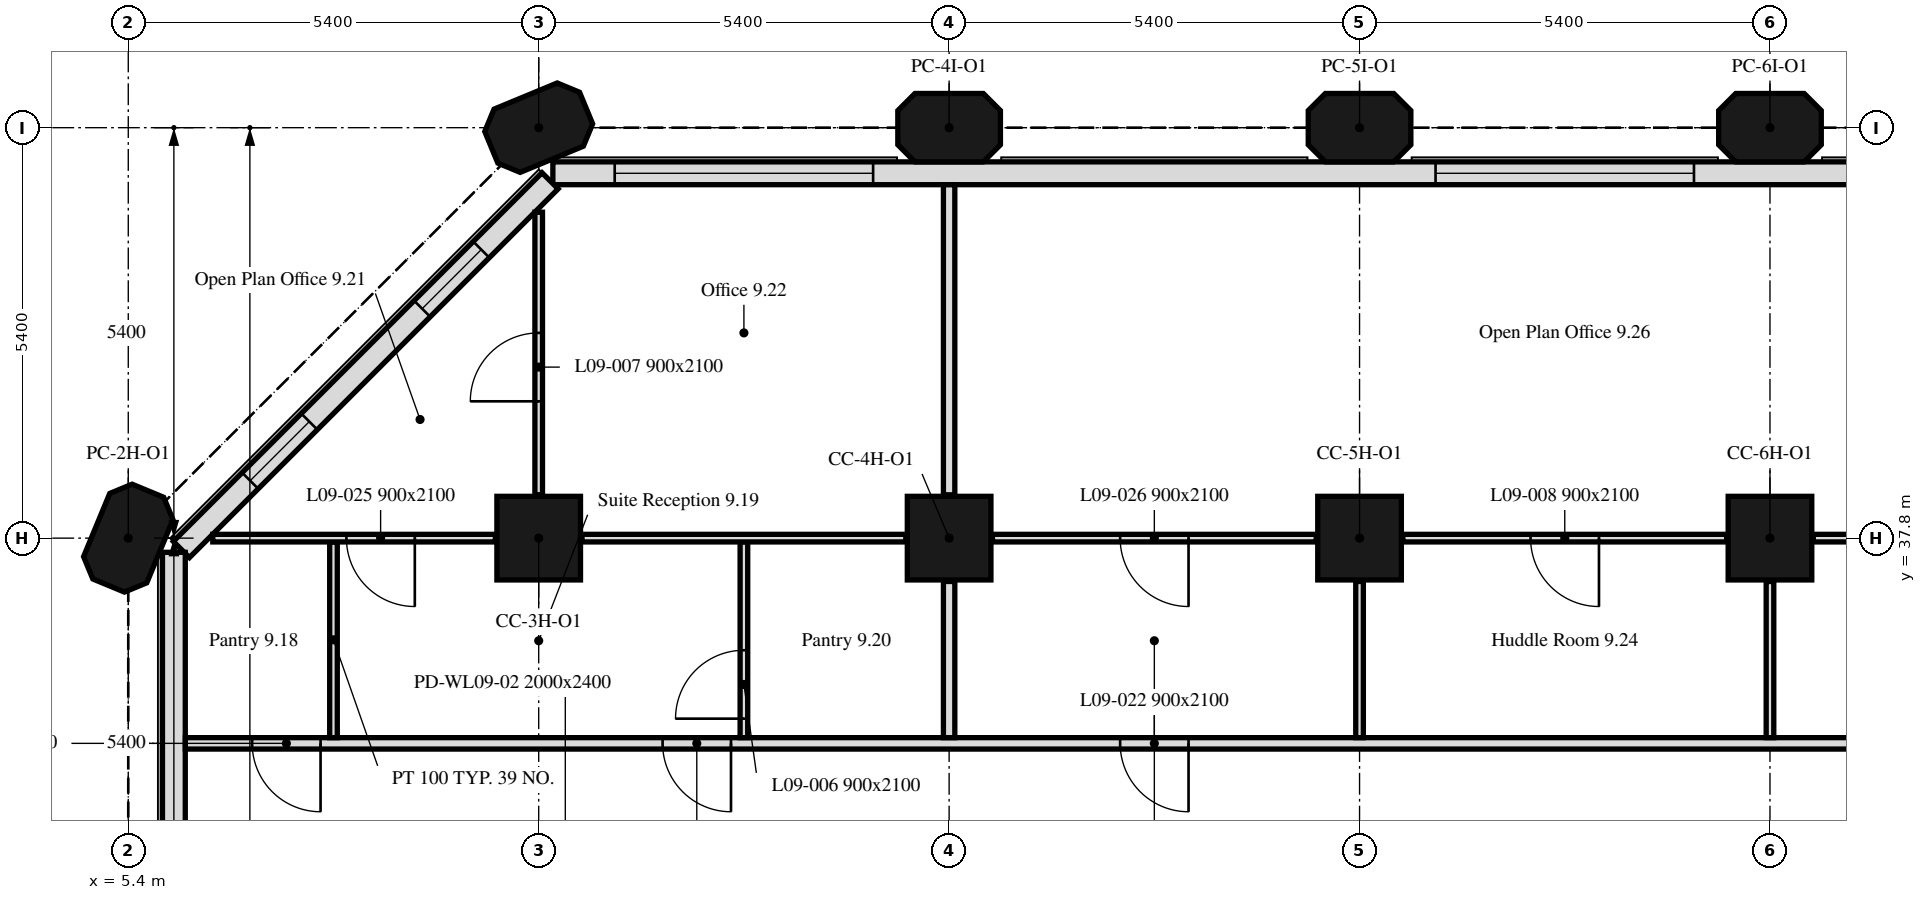
"""IFC4 building model, lengths in metres.
Left out: names, types, materials, properties, quantities, classifications, styles, units other than length and angle.
Written with IfcOpenShell. Run it as: python <this file> out.ifc"""

import sys

from ifc_helpers import new_model, si_unit, direction, frame, frame_2d, origin, origin_2d, place, context, subcontext, project, spatial, polyline, rectangle, outline, extrude, element, fill, save


model = new_model("IFC4")
c1 = context("Model", 3, precision=1e-05, world=origin(), true_north=direction((0.0, 1.0)))
c2 = subcontext(c1, "Body", "Model", "MODEL_VIEW")
j1 = project(units=[si_unit("LENGTHUNIT", "METRE"), si_unit("PLANEANGLEUNIT", "RADIAN")], contexts=[c1])
p1 = place(None, origin())
s1 = spatial("IfcSite", under=j1, at=p1, CompositionType="ELEMENT")
p2 = place(p1, origin())
s2 = spatial("IfcBuilding", under=s1, at=p2, CompositionType="ELEMENT")
p3 = place(p2, frame((0.0, 0.0, 45.0)))
s3 = spatial("IfcBuildingStorey", under=s2, at=p3, CompositionType="ELEMENT", Elevation=45.0)
p4 = place(p3, frame((5.4, 37.8, 0.0), z_axis=(0.0, 0.0, 1.0), x_axis=(0.382683432365, 0.923879532511, 0.0)))
e1 = element("IfcColumn", 1, at=p4, inside=s3, PredefinedType="COLUMN", context=c2, shape_type="SweptSolid", body=[
    extrude(outline(polyline([(-0.45, -0.45), (0.45, -0.45), (0.675, -0.225), (0.675, 0.225), (0.45, 0.45), (-0.45, 0.45), (-0.675, 0.225), (-0.675, -0.225), (-0.45, -0.45)])), origin(), (0.0, 0.0, 1.0), 3.5),
])
for number, where, z_axis, x_axis in (
    (2, (10.8, 37.8, 0.0), (0.0, 0.0, 1.0), (1.0, 0.0, 0.0)),
    (3, (16.2, 37.8, 0.0), (0.0, 0.0, 1.0), (1.0, 0.0, 0.0)),
    (4, (21.6, 37.8, 0.0), (0.0, 0.0, 1.0), (1.0, 0.0, 0.0)),
    (5, (27.0, 37.8, 0.0), (0.0, 0.0, 1.0), (1.0, 0.0, 0.0)),
):
    element("IfcColumn", number, at=place(p3, frame(where, z_axis=z_axis, x_axis=x_axis)), inside=s3, PredefinedType="COLUMN", context=c2, shape_type="SweptSolid", body=[
        extrude(rectangle(XDim=1.1, YDim=1.1, at=origin_2d()), origin(), (0.0, 0.0, 1.0), 3.5),
    ])
for number, where, z_axis, x_axis in (
    (6, (10.8, 43.2, 0.0), (0.0, 0.0, 1.0), (0.924, 0.383, 0.0)),
    (7, (16.2, 43.2, 0.0), (0.0, 0.0, 1.0), (1.0, 0.0, 0.0)),
    (8, (21.6, 43.2, 0.0), (0.0, 0.0, 1.0), (1.0, 0.0, 0.0)),
    (9, (27.0, 43.2, 0.0), (0.0, 0.0, 1.0), (1.0, 0.0, 0.0)),
):
    element("IfcColumn", number, at=place(p3, frame(where, z_axis=z_axis, x_axis=x_axis)), inside=s3, PredefinedType="COLUMN", context=c2, shape_type="SweptSolid", body=[
        extrude(outline(polyline([(-0.45, -0.45), (0.45, -0.45), (0.675, -0.225), (0.675, 0.225), (0.45, 0.45), (-0.45, 0.45), (-0.675, 0.225), (-0.675, -0.225), (-0.45, -0.45)])), origin(), (0.0, 0.0, 1.0), 3.5),
    ])
p5 = place(p3, frame((43.014, 42.6, 0.0), z_axis=(0.0, 0.0, 1.0), x_axis=(-1.0, 0.0, 0.0)))
e10 = element("IfcWall", 10, at=p5, inside=s3, PredefinedType="SOLIDWALL", context=c2, shape_type="SweptSolid", body=[
    extrude(rectangle(XDim=32.027, YDim=0.3, at=frame_2d((16.014, 0.0))), origin(), (0.0, 0.0, 1.0), 3.5),
])
p6 = place(p5, frame((6.214, 0.0, 0.9)))
e11 = element("IfcOpeningElement", 11, at=p6, cuts=e10, PredefinedType="OPENING", context=c2, shape_type="SweptSolid", body=[
    extrude(rectangle(XDim=3.4, YDim=1.7, at=frame_2d((1.7, 0.85))), frame((0.0, 0.16, 0.0), z_axis=(0.0, -1.0, 0.0), x_axis=(1.0, 0.0, 0.0)), (0.0, 0.0, 1.0), 0.32),
])
p7 = place(p5, frame((17.014, 0.0, 0.9)))
e12 = element("IfcOpeningElement", 12, at=p7, cuts=e10, PredefinedType="OPENING", context=c2, shape_type="SweptSolid", body=[
    extrude(rectangle(XDim=3.4, YDim=1.7, at=frame_2d((1.7, 0.85))), frame((0.0, 0.16, 0.0), z_axis=(0.0, -1.0, 0.0), x_axis=(1.0, 0.0, 0.0)), (0.0, 0.0, 1.0), 0.32),
])
p8 = place(p5, frame((27.814, 0.0, 0.9)))
e13 = element("IfcOpeningElement", 13, at=p8, cuts=e10, PredefinedType="OPENING", context=c2, shape_type="SweptSolid", body=[
    extrude(rectangle(XDim=3.4, YDim=1.7, at=frame_2d((1.7, 0.85))), frame((0.0, 0.16, 0.0), z_axis=(0.0, -1.0, 0.0), x_axis=(1.0, 0.0, 0.0)), (0.0, 0.0, 1.0), 0.32),
])
p9 = place(p3, frame((10.949, 42.501, 0.0), z_axis=(0.0, 0.0, 1.0), x_axis=(-0.707106781187, -0.707106781187, 0.0)))
e14 = element("IfcWall", 14, at=p9, inside=s3, PredefinedType="SOLIDWALL", context=c2, shape_type="SweptSolid", body=[
    extrude(rectangle(XDim=6.86, YDim=0.3, at=frame_2d((3.43, 0.0))), origin(), (0.0, 0.0, 1.0), 3.5),
])
p10 = place(p9, frame((1.28, 0.0, 0.9)))
e15 = element("IfcOpeningElement", 15, at=p10, cuts=e14, PredefinedType="OPENING", context=c2, shape_type="SweptSolid", body=[
    extrude(rectangle(XDim=1.1, YDim=1.7, at=frame_2d((0.55, 0.85))), frame((0.0, 0.16, 0.0), z_axis=(0.0, -1.0, 0.0), x_axis=(1.0, 0.0, 0.0)), (0.0, 0.0, 1.0), 0.32),
])
p11 = place(p9, frame((4.48, 0.0, 0.9)))
e16 = element("IfcOpeningElement", 16, at=p11, cuts=e14, PredefinedType="OPENING", context=c2, shape_type="SweptSolid", body=[
    extrude(rectangle(XDim=1.1, YDim=1.7, at=frame_2d((0.55, 0.85))), frame((0.0, 0.16, 0.0), z_axis=(0.0, -1.0, 0.0), x_axis=(1.0, 0.0, 0.0)), (0.0, 0.0, 1.0), 0.32),
])
p12 = place(p3, frame((6.0, 37.614, 0.0), z_axis=(0.0, 0.0, 1.0), x_axis=(0.0, -1.0, 0.0)))
e17 = element("IfcWall", 17, at=p12, inside=s3, PredefinedType="SOLIDWALL", context=c2, shape_type="SweptSolid", body=[
    extrude(rectangle(XDim=5.214, YDim=0.3, at=frame_2d((2.607, 0.0))), origin(), (0.0, 0.0, 1.0), 3.5),
])
p13 = place(p3, frame((47.849, 35.1, 0.0), z_axis=(0.0, 0.0, 1.0), x_axis=(-1.0, 0.0, 0.0)))
e18 = element("IfcWall", 18, at=p13, inside=s3, PredefinedType="PARTITIONING", context=c2, shape_type="SweptSolid", body=[
    extrude(rectangle(XDim=41.698, YDim=0.15, at=frame_2d((20.849, 0.0))), origin(), (0.0, 0.0, 1.0), 3.5),
])
p14 = place(p13, frame((39.919, 0.0, 0.0)))
e19 = element("IfcOpeningElement", 19, at=p14, cuts=e18, PredefinedType="OPENING", context=c2, shape_type="SweptSolid", body=[
    extrude(rectangle(XDim=0.9, YDim=2.1, at=frame_2d((0.45, 1.05))), frame((0.0, 0.075, 0.0), z_axis=(0.0, -1.0, 0.0), x_axis=(1.0, 0.0, 0.0)), (0.0, 0.0, 1.0), 0.15),
])
p15 = place(p13, frame((12.919, 0.0, 0.0)))
e20 = element("IfcOpeningElement", 20, at=p15, cuts=e18, PredefinedType="OPENING", context=c2, shape_type="SweptSolid", body=[
    extrude(rectangle(XDim=0.9, YDim=2.1, at=frame_2d((0.45, 1.05))), frame((0.0, 0.075, 0.0), z_axis=(0.0, -1.0, 0.0), x_axis=(1.0, 0.0, 0.0)), (0.0, 0.0, 1.0), 0.15),
])
p16 = place(p13, frame((28.499, 0.0, 0.0)))
e21 = element("IfcOpeningElement", 21, at=p16, cuts=e18, PredefinedType="OPENING", context=c2, shape_type="SweptSolid", body=[
    extrude(rectangle(XDim=0.9, YDim=2.1, at=frame_2d((0.45, 1.05))), frame((0.0, 0.075, 0.0), z_axis=(0.0, -1.0, 0.0), x_axis=(1.0, 0.0, 0.0)), (0.0, 0.0, 1.0), 0.15),
])
p17 = place(p13, frame((34.519, 0.0, 0.0)))
e22 = element("IfcOpeningElement", 22, at=p17, cuts=e18, PredefinedType="OPENING", context=c2, shape_type="SweptSolid", body=[
    extrude(rectangle(XDim=0.9, YDim=2.1, at=frame_2d((0.45, 1.05))), frame((0.0, 0.075, 0.0), z_axis=(0.0, -1.0, 0.0), x_axis=(1.0, 0.0, 0.0)), (0.0, 0.0, 1.0), 0.15),
])
p18 = place(p13, frame((6.279, 0.0, 0.0)))
e23 = element("IfcOpeningElement", 23, at=p18, cuts=e18, PredefinedType="OPENING", context=c2, shape_type="SweptSolid", body=[
    extrude(rectangle(XDim=0.9, YDim=2.1, at=frame_2d((0.45, 1.05))), frame((0.0, 0.075, 0.0), z_axis=(0.0, -1.0, 0.0), x_axis=(1.0, 0.0, 0.0)), (0.0, 0.0, 1.0), 0.15),
])
p19 = place(p3, frame((8.1, 35.175, 0.0), z_axis=(0.0, 0.0, 1.0), x_axis=(0.0, 1.0, 0.0)))
e24 = element("IfcWall", 24, at=p19, inside=s3, PredefinedType="PARTITIONING", context=c2, shape_type="SweptSolid", body=[
    extrude(rectangle(XDim=2.575, YDim=0.1, at=frame_2d((1.288, 0.0))), origin(), (0.0, 0.0, 1.0), 3.5),
])
p20 = place(p3, frame((13.5, 35.175, 0.0), z_axis=(0.0, 0.0, 1.0), x_axis=(0.0, 1.0, 0.0)))
e25 = element("IfcWall", 25, at=p20, inside=s3, PredefinedType="PARTITIONING", context=c2, shape_type="SweptSolid", body=[
    extrude(rectangle(XDim=2.575, YDim=0.1, at=frame_2d((1.288, 0.0))), origin(), (0.0, 0.0, 1.0), 3.5),
])
p21 = place(p20, frame((0.25, 0.0, 0.0)))
e26 = element("IfcOpeningElement", 26, at=p21, cuts=e25, PredefinedType="OPENING", context=c2, shape_type="SweptSolid", body=[
    extrude(rectangle(XDim=0.9, YDim=2.1, at=frame_2d((0.45, 1.05))), frame((0.0, 0.05, 0.0), z_axis=(0.0, -1.0, 0.0), x_axis=(1.0, 0.0, 0.0)), (0.0, 0.0, 1.0), 0.1),
])
p22 = place(p3, frame((10.23, 37.8, 0.0), z_axis=(0.0, 0.0, 1.0), x_axis=(-1.0, 0.0, 0.0)))
e27 = element("IfcWall", 27, at=p22, inside=s3, PredefinedType="PARTITIONING", context=c2, shape_type="SweptSolid", body=[
    extrude(rectangle(XDim=3.718, YDim=0.1, at=frame_2d((1.859, 0.0))), origin(), (0.0, 0.0, 1.0), 3.5),
])
p23 = place(p22, frame((1.06, 0.0, 0.0)))
e28 = element("IfcOpeningElement", 28, at=p23, cuts=e27, PredefinedType="OPENING", context=c2, shape_type="SweptSolid", body=[
    extrude(rectangle(XDim=0.9, YDim=2.1, at=frame_2d((0.45, 1.05))), frame((0.0, 0.05, 0.0), z_axis=(0.0, -1.0, 0.0), x_axis=(1.0, 0.0, 0.0)), (0.0, 0.0, 1.0), 0.1),
])
p24 = place(p3, frame((16.2, 35.175, 0.0), z_axis=(0.0, 0.0, 1.0), x_axis=(0.0, 1.0, 0.0)))
e29 = element("IfcWall", 29, at=p24, inside=s3, PredefinedType="PARTITIONING", context=c2, shape_type="SweptSolid", body=[
    extrude(rectangle(XDim=2.055, YDim=0.15, at=frame_2d((1.027, 0.0))), origin(), (0.0, 0.0, 1.0), 3.5),
])
p25 = place(p3, frame((15.63, 37.8, 0.0), z_axis=(0.0, 0.0, 1.0), x_axis=(-1.0, 0.0, 0.0)))
e30 = element("IfcWall", 30, at=p25, inside=s3, PredefinedType="PARTITIONING", context=c2, shape_type="SweptSolid", body=[
    extrude(rectangle(XDim=4.26, YDim=0.1, at=frame_2d((2.13, 0.0))), origin(), (0.0, 0.0, 1.0), 3.5),
])
p26 = place(p3, frame((10.8, 38.37, 0.0), z_axis=(0.0, 0.0, 1.0), x_axis=(0.0, 1.0, 0.0)))
e31 = element("IfcWall", 31, at=p26, inside=s3, PredefinedType="PARTITIONING", context=c2, shape_type="SweptSolid", body=[
    extrude(rectangle(XDim=3.718, YDim=0.1, at=frame_2d((1.859, 0.0))), origin(), (0.0, 0.0, 1.0), 3.5),
])
p27 = place(p26, frame((1.23, 0.0, 0.0)))
e32 = element("IfcOpeningElement", 32, at=p27, cuts=e31, PredefinedType="OPENING", context=c2, shape_type="SweptSolid", body=[
    extrude(rectangle(XDim=0.9, YDim=2.1, at=frame_2d((0.45, 1.05))), frame((0.0, 0.05, 0.0), z_axis=(0.0, -1.0, 0.0), x_axis=(1.0, 0.0, 0.0)), (0.0, 0.0, 1.0), 0.1),
])
p28 = place(p3, frame((16.2, 38.37, 0.0), z_axis=(0.0, 0.0, 1.0), x_axis=(0.0, 1.0, 0.0)))
e33 = element("IfcWall", 33, at=p28, inside=s3, PredefinedType="PARTITIONING", context=c2, shape_type="SweptSolid", body=[
    extrude(rectangle(XDim=4.079, YDim=0.15, at=frame_2d((2.04, 0.0))), origin(), (0.0, 0.0, 1.0), 3.5),
])
p29 = place(p3, frame((21.6, 35.175, 0.0), z_axis=(0.0, 0.0, 1.0), x_axis=(0.0, 1.0, 0.0)))
e34 = element("IfcWall", 34, at=p29, inside=s3, PredefinedType="PARTITIONING", context=c2, shape_type="SweptSolid", body=[
    extrude(rectangle(XDim=2.055, YDim=0.1, at=frame_2d((1.027, 0.0))), origin(), (0.0, 0.0, 1.0), 3.5),
])
p30 = place(p3, frame((21.03, 37.8, 0.0), z_axis=(0.0, 0.0, 1.0), x_axis=(-1.0, 0.0, 0.0)))
e35 = element("IfcWall", 35, at=p30, inside=s3, PredefinedType="PARTITIONING", context=c2, shape_type="SweptSolid", body=[
    extrude(rectangle(XDim=4.26, YDim=0.1, at=frame_2d((2.13, 0.0))), origin(), (0.0, 0.0, 1.0), 3.5),
])
p31 = place(p30, frame((1.68, 0.0, 0.0)))
e36 = element("IfcOpeningElement", 36, at=p31, cuts=e35, PredefinedType="OPENING", context=c2, shape_type="SweptSolid", body=[
    extrude(rectangle(XDim=0.9, YDim=2.1, at=frame_2d((0.45, 1.05))), frame((0.0, 0.05, 0.0), z_axis=(0.0, -1.0, 0.0), x_axis=(1.0, 0.0, 0.0)), (0.0, 0.0, 1.0), 0.1),
])
p32 = place(p3, frame((27.0, 35.175, 0.0), z_axis=(0.0, 0.0, 1.0), x_axis=(0.0, 1.0, 0.0)))
e37 = element("IfcWall", 37, at=p32, inside=s3, PredefinedType="PARTITIONING", context=c2, shape_type="SweptSolid", body=[
    extrude(rectangle(XDim=2.055, YDim=0.1, at=frame_2d((1.027, 0.0))), origin(), (0.0, 0.0, 1.0), 3.5),
])
p33 = place(p3, frame((26.43, 37.8, 0.0), z_axis=(0.0, 0.0, 1.0), x_axis=(-1.0, 0.0, 0.0)))
e38 = element("IfcWall", 38, at=p33, inside=s3, PredefinedType="PARTITIONING", context=c2, shape_type="SweptSolid", body=[
    extrude(rectangle(XDim=4.26, YDim=0.1, at=frame_2d((2.13, 0.0))), origin(), (0.0, 0.0, 1.0), 3.5),
])
p34 = place(p33, frame((1.68, 0.0, 0.0)))
e39 = element("IfcOpeningElement", 39, at=p34, cuts=e38, PredefinedType="OPENING", context=c2, shape_type="SweptSolid", body=[
    extrude(rectangle(XDim=0.9, YDim=2.1, at=frame_2d((0.45, 1.05))), frame((0.0, 0.05, 0.0), z_axis=(0.0, -1.0, 0.0), x_axis=(1.0, 0.0, 0.0)), (0.0, 0.0, 1.0), 0.1),
])
p35 = place(p3, frame((31.83, 37.8, 0.0), z_axis=(0.0, 0.0, 1.0), x_axis=(-1.0, 0.0, 0.0)))
e40 = element("IfcWall", 40, at=p35, inside=s3, PredefinedType="PARTITIONING", context=c2, shape_type="SweptSolid", body=[
    extrude(rectangle(XDim=4.26, YDim=0.1, at=frame_2d((2.13, 0.0))), origin(), (0.0, 0.0, 1.0), 3.5),
])
p36 = place(p35, frame((1.68, 0.0, 0.0)))
e41 = element("IfcOpeningElement", 41, at=p36, cuts=e40, PredefinedType="OPENING", context=c2, shape_type="SweptSolid", body=[
    extrude(rectangle(XDim=0.9, YDim=2.1, at=frame_2d((0.45, 1.05))), frame((0.0, 0.05, 0.0), z_axis=(0.0, -1.0, 0.0), x_axis=(1.0, 0.0, 0.0)), (0.0, 0.0, 1.0), 0.1),
])
p37 = place(p7, origin())
e42 = element("IfcWindow", 42, at=p37, inside=s3, PartitioningType="SINGLE_PANEL", PredefinedType="WINDOW", context=c2, shape_type="SweptSolid", body=[
    extrude(rectangle(XDim=3.4, YDim=1.7, at=frame_2d((1.7, 0.85))), frame((0.0, 0.03, 0.0), z_axis=(0.0, -1.0, 0.0), x_axis=(1.0, 0.0, 0.0)), (0.0, 0.0, 1.0), 0.06),
])
fill(e12, e42)
p38 = place(p8, origin())
e43 = element("IfcWindow", 43, at=p38, inside=s3, PartitioningType="SINGLE_PANEL", PredefinedType="WINDOW", context=c2, shape_type="SweptSolid", body=[
    extrude(rectangle(XDim=3.4, YDim=1.7, at=frame_2d((1.7, 0.85))), frame((0.0, 0.03, 0.0), z_axis=(0.0, -1.0, 0.0), x_axis=(1.0, 0.0, 0.0)), (0.0, 0.0, 1.0), 0.06),
])
fill(e13, e43)
p39 = place(p10, origin())
e44 = element("IfcWindow", 44, at=p39, inside=s3, PartitioningType="SINGLE_PANEL", PredefinedType="WINDOW", context=c2, shape_type="SweptSolid", body=[
    extrude(rectangle(XDim=1.1, YDim=1.7, at=frame_2d((0.55, 0.85))), frame((0.0, 0.03, 0.0), z_axis=(0.0, -1.0, 0.0), x_axis=(1.0, 0.0, 0.0)), (0.0, 0.0, 1.0), 0.06),
])
fill(e15, e44)
p40 = place(p11, origin())
e45 = element("IfcWindow", 45, at=p40, inside=s3, PartitioningType="SINGLE_PANEL", PredefinedType="WINDOW", context=c2, shape_type="SweptSolid", body=[
    extrude(rectangle(XDim=1.1, YDim=1.7, at=frame_2d((0.55, 0.85))), frame((0.0, 0.03, 0.0), z_axis=(0.0, -1.0, 0.0), x_axis=(1.0, 0.0, 0.0)), (0.0, 0.0, 1.0), 0.06),
])
fill(e16, e45)
p41 = place(p14, origin())
e46 = element("IfcDoor", 46, at=p41, inside=s3, OperationType="SINGLE_SWING_RIGHT", PredefinedType="DOOR", context=c2, shape_type="SweptSolid", body=[
    extrude(rectangle(XDim=0.9, YDim=2.1, at=frame_2d((0.45, 1.05))), frame((0.0, 0.025, 0.0), z_axis=(0.0, -1.0, 0.0), x_axis=(1.0, 0.0, 0.0)), (0.0, 0.0, 1.0), 0.05),
])
fill(e19, e46)
p42 = place(p21, origin())
e47 = element("IfcDoor", 47, at=p42, inside=s3, OperationType="SINGLE_SWING_LEFT", PredefinedType="DOOR", context=c2, shape_type="SweptSolid", body=[
    extrude(rectangle(XDim=0.9, YDim=2.1, at=frame_2d((0.45, 1.05))), frame((0.0, 0.025, 0.0), z_axis=(0.0, -1.0, 0.0), x_axis=(1.0, 0.0, 0.0)), (0.0, 0.0, 1.0), 0.05),
])
fill(e26, e47)
p43 = place(p27, origin())
e48 = element("IfcDoor", 48, at=p43, inside=s3, OperationType="SINGLE_SWING_LEFT", PredefinedType="DOOR", context=c2, shape_type="SweptSolid", body=[
    extrude(rectangle(XDim=0.9, YDim=2.1, at=frame_2d((0.45, 1.05))), frame((0.0, 0.025, 0.0), z_axis=(0.0, -1.0, 0.0), x_axis=(1.0, 0.0, 0.0)), (0.0, 0.0, 1.0), 0.05),
])
fill(e32, e48)
p44 = place(p34, origin())
e49 = element("IfcDoor", 49, at=p44, inside=s3, OperationType="SINGLE_SWING_LEFT", PredefinedType="DOOR", context=c2, shape_type="SweptSolid", body=[
    extrude(rectangle(XDim=0.9, YDim=2.1, at=frame_2d((0.45, 1.05))), frame((0.0, 0.025, 0.0), z_axis=(0.0, -1.0, 0.0), x_axis=(1.0, 0.0, 0.0)), (0.0, 0.0, 1.0), 0.05),
])
fill(e39, e49)
p45 = place(p16, origin())
e50 = element("IfcDoor", 50, at=p45, inside=s3, OperationType="SINGLE_SWING_RIGHT", PredefinedType="DOOR", context=c2, shape_type="SweptSolid", body=[
    extrude(rectangle(XDim=0.9, YDim=2.1, at=frame_2d((0.45, 1.05))), frame((0.0, 0.025, 0.0), z_axis=(0.0, -1.0, 0.0), x_axis=(1.0, 0.0, 0.0)), (0.0, 0.0, 1.0), 0.05),
])
fill(e21, e50)
p46 = place(p23, origin())
e51 = element("IfcDoor", 51, at=p46, inside=s3, OperationType="SINGLE_SWING_RIGHT", PredefinedType="DOOR", context=c2, shape_type="SweptSolid", body=[
    extrude(rectangle(XDim=0.9, YDim=2.1, at=frame_2d((0.45, 1.05))), frame((0.0, 0.025, 0.0), z_axis=(0.0, -1.0, 0.0), x_axis=(1.0, 0.0, 0.0)), (0.0, 0.0, 1.0), 0.05),
])
fill(e28, e51)
p47 = place(p31, origin())
e52 = element("IfcDoor", 52, at=p47, inside=s3, OperationType="SINGLE_SWING_RIGHT", PredefinedType="DOOR", context=c2, shape_type="SweptSolid", body=[
    extrude(rectangle(XDim=0.9, YDim=2.1, at=frame_2d((0.45, 1.05))), frame((0.0, 0.025, 0.0), z_axis=(0.0, -1.0, 0.0), x_axis=(1.0, 0.0, 0.0)), (0.0, 0.0, 1.0), 0.05),
])
fill(e36, e52)
p48 = place(p17, origin())
e53 = element("IfcDoor", 53, at=p48, inside=s3, OperationType="SINGLE_SWING_RIGHT", PredefinedType="DOOR", context=c2, shape_type="SweptSolid", body=[
    extrude(rectangle(XDim=0.9, YDim=2.1, at=frame_2d((0.45, 1.05))), frame((0.0, 0.025, 0.0), z_axis=(0.0, -1.0, 0.0), x_axis=(1.0, 0.0, 0.0)), (0.0, 0.0, 1.0), 0.05),
])
fill(e22, e53)
save(model, sys.argv[1])
